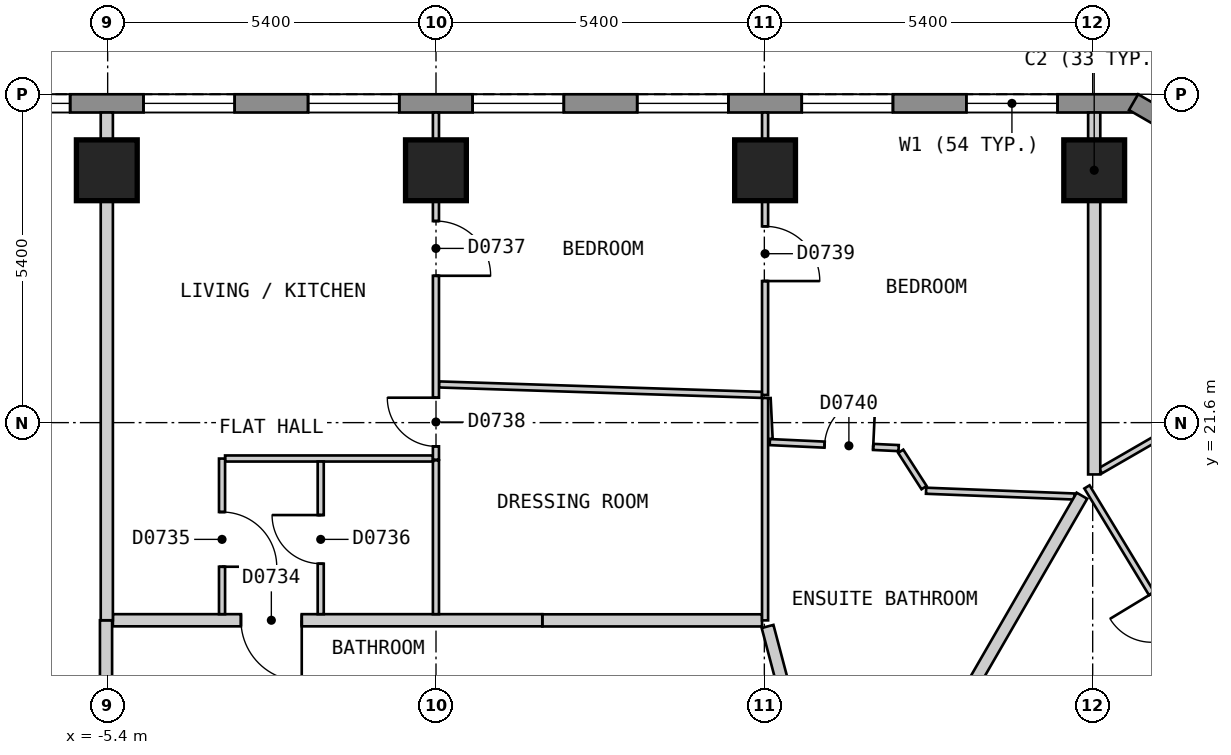
"""IFC4 building model, lengths in metres.
Left out: names, types, materials, properties, quantities, classifications, styles, units other than length and angle.
Written with IfcOpenShell. Run it as: python <this file> out.ifc"""

import sys

from ifc_helpers import new_model, si_unit, direction, frame, frame_2d, origin, origin_2d, place, context, subcontext, project, spatial, polyline, rectangle, outline, extrude, element, fill, save


model = new_model("IFC4")
c1 = context("Model", 3, precision=1e-05, world=origin(), true_north=direction((0.0, 1.0)))
c2 = subcontext(c1, "Body", "Model", "MODEL_VIEW")
j1 = project(units=[si_unit("LENGTHUNIT", "METRE"), si_unit("PLANEANGLEUNIT", "RADIAN")], contexts=[c1])
p1 = place(None, origin())
s1 = spatial("IfcSite", under=j1, at=p1, CompositionType="ELEMENT")
p2 = place(p1, origin())
s2 = spatial("IfcBuilding", under=s1, at=p2, CompositionType="ELEMENT")
p3 = place(p2, frame((0.0, 0.0, 93.0)))
s3 = spatial("IfcBuildingStorey", under=s2, at=p3, CompositionType="ELEMENT", Elevation=93.0)
for number, where, z_axis, x_axis in (
    (1, (10.825, 25.75, 0.0), (0.0, 0.0, 1.0), (-1.0, 0.0, 0.0)),
    (2, (5.412, 25.75, 0.0), (0.0, 0.0, 1.0), (-1.0, 0.0, 0.0)),
    (3, (-0.001, 25.75, 0.0), (0.0, 0.0, 1.0), (-1.0, 0.0, 0.0)),
    (4, (-5.414, 25.75, 0.0), (0.0, 0.0, 1.0), (-1.0, 0.0, 0.0)),
):
    element("IfcColumn", number, at=place(p3, frame(where, z_axis=z_axis, x_axis=x_axis)), inside=s3, PredefinedType="COLUMN", context=c2, shape_type="SweptSolid", body=[
        extrude(rectangle(XDim=1.0, YDim=1.0, at=origin_2d()), origin(), (0.0, 0.0, 1.0), 3.0),
    ])
p4 = place(p3, frame((11.547, 26.85, 0.0), z_axis=(0.0, 0.0, 1.0), x_axis=(-1.0, 0.0, 0.0)))
e5 = element("IfcWall", 5, at=p4, inside=s3, PredefinedType="SOLIDWALL", context=c2, shape_type="SweptSolid", body=[
    extrude(outline(polyline([(0.0, -0.15), (23.094, -0.15), (23.014, 0.15), (0.08, 0.15), (0.0, -0.15)])), origin(), (0.0, 0.0, 1.0), 2.7),
])
p5 = place(p4, frame((1.325, 0.0, 0.15)))
e6 = element("IfcOpeningElement", 6, at=p5, cuts=e5, PredefinedType="OPENING", context=c2, shape_type="SweptSolid", body=[
    extrude(rectangle(XDim=1.5, YDim=2.1, at=frame_2d((0.75, 1.05))), frame((0.0, 0.16, 0.0), z_axis=(0.0, -1.0, 0.0), x_axis=(1.0, 0.0, 0.0)), (0.0, 0.0, 1.0), 0.32),
])
p6 = place(p4, frame((4.032, 0.0, 0.15)))
e7 = element("IfcOpeningElement", 7, at=p6, cuts=e5, PredefinedType="OPENING", context=c2, shape_type="SweptSolid", body=[
    extrude(rectangle(XDim=1.5, YDim=2.1, at=frame_2d((0.75, 1.05))), frame((0.0, 0.16, 0.0), z_axis=(0.0, -1.0, 0.0), x_axis=(1.0, 0.0, 0.0)), (0.0, 0.0, 1.0), 0.32),
])
p7 = place(p4, frame((6.738, 0.0, 0.15)))
e8 = element("IfcOpeningElement", 8, at=p7, cuts=e5, PredefinedType="OPENING", context=c2, shape_type="SweptSolid", body=[
    extrude(rectangle(XDim=1.5, YDim=2.1, at=frame_2d((0.75, 1.05))), frame((0.0, 0.16, 0.0), z_axis=(0.0, -1.0, 0.0), x_axis=(1.0, 0.0, 0.0)), (0.0, 0.0, 1.0), 0.32),
])
p8 = place(p4, frame((9.445, 0.0, 0.15)))
e9 = element("IfcOpeningElement", 9, at=p8, cuts=e5, PredefinedType="OPENING", context=c2, shape_type="SweptSolid", body=[
    extrude(rectangle(XDim=1.5, YDim=2.1, at=frame_2d((0.75, 1.05))), frame((0.0, 0.16, 0.0), z_axis=(0.0, -1.0, 0.0), x_axis=(1.0, 0.0, 0.0)), (0.0, 0.0, 1.0), 0.32),
])
p9 = place(p4, frame((12.151, 0.0, 0.15)))
e10 = element("IfcOpeningElement", 10, at=p9, cuts=e5, PredefinedType="OPENING", context=c2, shape_type="SweptSolid", body=[
    extrude(rectangle(XDim=1.5, YDim=2.1, at=frame_2d((0.75, 1.05))), frame((0.0, 0.16, 0.0), z_axis=(0.0, -1.0, 0.0), x_axis=(1.0, 0.0, 0.0)), (0.0, 0.0, 1.0), 0.32),
])
p10 = place(p4, frame((14.858, 0.0, 0.15)))
e11 = element("IfcOpeningElement", 11, at=p10, cuts=e5, PredefinedType="OPENING", context=c2, shape_type="SweptSolid", body=[
    extrude(rectangle(XDim=1.5, YDim=2.1, at=frame_2d((0.75, 1.05))), frame((0.0, 0.16, 0.0), z_axis=(0.0, -1.0, 0.0), x_axis=(1.0, 0.0, 0.0)), (0.0, 0.0, 1.0), 0.32),
])
p11 = place(p4, frame((17.564, 0.0, 0.15)))
e12 = element("IfcOpeningElement", 12, at=p11, cuts=e5, PredefinedType="OPENING", context=c2, shape_type="SweptSolid", body=[
    extrude(rectangle(XDim=1.5, YDim=2.1, at=frame_2d((0.75, 1.05))), frame((0.0, 0.16, 0.0), z_axis=(0.0, -1.0, 0.0), x_axis=(1.0, 0.0, 0.0)), (0.0, 0.0, 1.0), 0.32),
])
p12 = place(p4, frame((20.271, 0.0, 0.15)))
e13 = element("IfcOpeningElement", 13, at=p12, cuts=e5, PredefinedType="OPENING", context=c2, shape_type="SweptSolid", body=[
    extrude(rectangle(XDim=1.5, YDim=2.1, at=frame_2d((0.75, 1.05))), frame((0.0, 0.16, 0.0), z_axis=(0.0, -1.0, 0.0), x_axis=(1.0, 0.0, 0.0)), (0.0, 0.0, 1.0), 0.32),
])
p13 = place(p3, frame((15.802, 24.37, 0.0), z_axis=(0.0, 0.0, 1.0), x_axis=(-0.866022959057, 0.500004234368, 0.0)))
e14 = element("IfcWall", 14, at=p13, inside=s3, PredefinedType="SOLIDWALL", context=c2, shape_type="SweptSolid", body=[
    extrude(outline(polyline([(0.0, -0.15), (5.0, -0.15), (4.92, 0.15), (0.08, 0.15), (0.0, -0.15)])), origin(), (0.0, 0.0, 1.0), 2.7),
])
p14 = place(p13, frame((0.65, 0.0, 0.15)))
e15 = element("IfcOpeningElement", 15, at=p14, cuts=e14, PredefinedType="OPENING", context=c2, shape_type="SweptSolid", body=[
    extrude(rectangle(XDim=1.2, YDim=2.1, at=frame_2d((0.6, 1.05))), frame((0.0, 0.16, 0.0), z_axis=(0.0, -1.0, 0.0), x_axis=(1.0, 0.0, 0.0)), (0.0, 0.0, 1.0), 0.32),
])
p15 = place(p13, frame((3.15, 0.0, 0.15)))
e16 = element("IfcOpeningElement", 16, at=p15, cuts=e14, PredefinedType="OPENING", context=c2, shape_type="SweptSolid", body=[
    extrude(rectangle(XDim=1.2, YDim=2.1, at=frame_2d((0.6, 1.05))), frame((0.0, 0.16, 0.0), z_axis=(0.0, -1.0, 0.0), x_axis=(1.0, 0.0, 0.0)), (0.0, 0.0, 1.0), 0.32),
])
p16 = place(p3, frame((5.453, 18.248, 0.0), z_axis=(0.0, 0.0, 1.0), x_axis=(0.255687088482, -0.9667595941, 0.0)))
e17 = element("IfcWall", 17, at=p16, inside=s3, PredefinedType="PARTITIONING", context=c2, shape_type="SweptSolid", body=[
    extrude(rectangle(XDim=1.6, YDim=0.2, at=frame_2d((0.8, 0.0))), origin(), (0.0, 0.0, 1.0), 2.7),
])
p17 = place(p3, frame((1.75, 18.348, 0.0), z_axis=(0.0, 0.0, 1.0), x_axis=(1.0, 0.0, 0.0)))
e18 = element("IfcWall", 18, at=p17, inside=s3, PredefinedType="PARTITIONING", context=c2, shape_type="SweptSolid", body=[
    extrude(rectangle(XDim=3.612, YDim=0.2, at=frame_2d((1.806, 0.0))), origin(), (0.0, 0.0, 1.0), 2.7),
])
p18 = place(p3, frame((-5.314, 18.35, 0.0), z_axis=(0.0, 0.0, 1.0), x_axis=(1.0, 0.0, 0.0)))
e19 = element("IfcWall", 19, at=p18, inside=s3, PredefinedType="PARTITIONING", context=c2, shape_type="SweptSolid", body=[
    extrude(rectangle(XDim=7.062, YDim=0.2, at=frame_2d((3.531, 0.0))), origin(), (0.0, 0.0, 1.0), 2.7),
])
p19 = place(p18, frame((2.106, 0.0, 0.0)))
e20 = element("IfcOpeningElement", 20, at=p19, cuts=e19, PredefinedType="OPENING", context=c2, shape_type="SweptSolid", body=[
    extrude(rectangle(XDim=1.0, YDim=2.1, at=frame_2d((0.5, 1.05))), frame((0.0, 0.11, 0.0), z_axis=(0.0, -1.0, 0.0), x_axis=(1.0, 0.0, 0.0)), (0.0, 0.0, 1.0), 0.22),
])
p20 = place(p3, frame((-5.427, 17.4, 0.0), z_axis=(0.0, 0.0, 1.0), x_axis=(0.0, 1.0, 0.0)))
e21 = element("IfcWall", 21, at=p20, inside=s3, PredefinedType="PARTITIONING", context=c2, shape_type="SweptSolid", body=[
    extrude(rectangle(XDim=0.95, YDim=0.2, at=frame_2d((0.475, 0.0))), origin(), (0.0, 0.0, 1.0), 2.7),
])
p21 = place(p3, frame((7.643, 21.129, 0.0), z_axis=(0.0, 0.0, 1.0), x_axis=(0.540427628168, -0.841390503104, 0.0)))
e22 = element("IfcWall", 22, at=p21, inside=s3, PredefinedType="PARTITIONING", context=c2, shape_type="SweptSolid", body=[
    extrude(rectangle(XDim=0.711, YDim=0.1, at=frame_2d((0.355, 0.0))), origin(), (0.0, 0.0, 1.0), 2.7),
])
p22 = place(p3, frame((10.706, 20.543, 0.0), z_axis=(0.0, 0.0, 1.0), x_axis=(0.518240414093, -0.855234981278, 0.0)))
e23 = element("IfcWall", 23, at=p22, inside=s3, PredefinedType="PARTITIONING", context=c2, shape_type="SweptSolid", body=[
    extrude(rectangle(XDim=4.855, YDim=0.1, at=frame_2d((2.427, 0.0))), origin(), (0.0, 0.0, 1.0), 2.7),
])
p23 = place(p22, frame((2.052, 0.0, 0.0)))
e24 = element("IfcOpeningElement", 24, at=p23, cuts=e23, PredefinedType="OPENING", context=c2, shape_type="SweptSolid", body=[
    extrude(rectangle(XDim=0.8, YDim=2.1, at=frame_2d((0.4, 1.05))), frame((0.0, 0.06, 0.0), z_axis=(0.0, -1.0, 0.0), x_axis=(1.0, 0.0, 0.0)), (0.0, 0.0, 1.0), 0.12),
])
p24 = place(p3, frame((5.454, 22.002, 0.0), z_axis=(0.0, 0.0, 1.0), x_axis=(0.048996315227, -0.998798959298, 0.0)))
e25 = element("IfcWall", 25, at=p24, inside=s3, PredefinedType="PARTITIONING", context=c2, shape_type="SweptSolid", body=[
    extrude(rectangle(XDim=0.673, YDim=0.1, at=frame_2d((0.336, 0.0))), origin(), (0.0, 0.0, 1.0), 2.7),
])
p25 = place(p3, frame((-0.001, 20.98, 0.0), z_axis=(0.0, 0.0, 1.0), x_axis=(0.0, -1.0, 0.0)))
e26 = element("IfcWall", 26, at=p25, inside=s3, PredefinedType="PARTITIONING", context=c2, shape_type="SweptSolid", body=[
    extrude(rectangle(XDim=2.53, YDim=0.1, at=frame_2d((1.265, 0.0))), origin(), (0.0, 0.0, 1.0), 2.7),
])
p26 = place(p3, frame((5.412, 22.005, 0.0), z_axis=(0.0, 0.0, 1.0), x_axis=(0.0, -1.0, 0.0)))
e27 = element("IfcWall", 27, at=p26, inside=s3, PredefinedType="PARTITIONING", context=c2, shape_type="SweptSolid", body=[
    extrude(rectangle(XDim=3.657, YDim=0.1, at=frame_2d((1.829, 0.0))), origin(), (0.0, 0.0, 1.0), 2.7),
])
p27 = place(p3, frame((8.06, 20.48, 0.0), z_axis=(0.0, 0.0, 1.0), x_axis=(0.999243345912, -0.038893902497, 0.0)))
e28 = element("IfcWall", 28, at=p27, inside=s3, PredefinedType="PARTITIONING", context=c2, shape_type="SweptSolid", body=[
    extrude(rectangle(XDim=2.442, YDim=0.1, at=frame_2d((1.221, 0.0))), origin(), (0.0, 0.0, 1.0), 2.7),
])
p28 = place(p3, frame((0.049, 22.228, 0.0), z_axis=(0.0, 0.0, 1.0), x_axis=(0.99947566488, -0.032378933174, 0.0)))
e29 = element("IfcWall", 29, at=p28, inside=s3, PredefinedType="PARTITIONING", context=c2, shape_type="SweptSolid", body=[
    extrude(rectangle(XDim=5.316, YDim=0.1, at=frame_2d((2.658, 0.0))), origin(), (0.0, 0.0, 1.0), 2.7),
])
p29 = place(p3, frame((5.49, 21.28, 0.0), z_axis=(0.0, 0.0, 1.0), x_axis=(0.998907627838, -0.046728482187, 0.0)))
e30 = element("IfcWall", 30, at=p29, inside=s3, PredefinedType="PARTITIONING", context=c2, shape_type="SweptSolid", body=[
    extrude(rectangle(XDim=2.121, YDim=0.1, at=frame_2d((1.061, 0.0))), origin(), (0.0, 0.0, 1.0), 2.7),
])
p30 = place(p29, frame((0.902, 0.0, 0.0)))
e31 = element("IfcOpeningElement", 31, at=p30, cuts=e30, PredefinedType="OPENING", context=c2, shape_type="SweptSolid", body=[
    extrude(rectangle(XDim=0.8, YDim=2.1, at=frame_2d((0.4, 1.05))), frame((0.0, 0.06, 0.0), z_axis=(0.0, -1.0, 0.0), x_axis=(1.0, 0.0, 0.0)), (0.0, 0.0, 1.0), 0.12),
])
p31 = place(p3, frame((-3.469, 21.01, 0.0), z_axis=(0.0, 0.0, 1.0), x_axis=(1.0, 0.0, 0.0)))
e32 = element("IfcWall", 32, at=p31, inside=s3, PredefinedType="PARTITIONING", context=c2, shape_type="SweptSolid", body=[
    extrude(rectangle(XDim=3.418, YDim=0.1, at=frame_2d((1.709, 0.0))), origin(), (0.0, 0.0, 1.0), 2.7),
])
p32 = place(p3, frame((5.412, 22.055, 0.0), z_axis=(0.0, 0.0, 1.0), x_axis=(0.0, 1.0, 0.0)))
e33 = element("IfcWall", 33, at=p32, inside=s3, PredefinedType="PARTITIONING", context=c2, shape_type="SweptSolid", body=[
    extrude(rectangle(XDim=4.645, YDim=0.1, at=frame_2d((2.323, 0.0))), origin(), (0.0, 0.0, 1.0), 2.7),
])
p33 = place(p32, frame((1.873, 0.0, 0.0)))
e34 = element("IfcOpeningElement", 34, at=p33, cuts=e33, PredefinedType="OPENING", context=c2, shape_type="SweptSolid", body=[
    extrude(rectangle(XDim=0.9, YDim=2.1, at=frame_2d((0.45, 1.05))), frame((0.0, 0.06, 0.0), z_axis=(0.0, -1.0, 0.0), x_axis=(1.0, 0.0, 0.0)), (0.0, 0.0, 1.0), 0.12),
])
p34 = place(p3, frame((-0.001, 20.99, 0.0), z_axis=(0.0, 0.0, 1.0), x_axis=(0.0, 1.0, 0.0)))
e35 = element("IfcWall", 35, at=p34, inside=s3, PredefinedType="PARTITIONING", context=c2, shape_type="SweptSolid", body=[
    extrude(rectangle(XDim=5.71, YDim=0.1, at=frame_2d((2.855, 0.0))), origin(), (0.0, 0.0, 1.0), 2.7),
])
p35 = place(p34, frame((3.025, 0.0, 0.0)))
e36 = element("IfcOpeningElement", 36, at=p35, cuts=e35, PredefinedType="OPENING", context=c2, shape_type="SweptSolid", body=[
    extrude(rectangle(XDim=0.9, YDim=2.1, at=frame_2d((0.45, 1.05))), frame((0.0, 0.06, 0.0), z_axis=(0.0, -1.0, 0.0), x_axis=(1.0, 0.0, 0.0)), (0.0, 0.0, 1.0), 0.12),
])
p36 = place(p34, frame((0.22, 0.0, 0.0)))
e37 = element("IfcOpeningElement", 37, at=p36, cuts=e35, PredefinedType="OPENING", context=c2, shape_type="SweptSolid", body=[
    extrude(rectangle(XDim=0.8, YDim=2.1, at=frame_2d((0.4, 1.05))), frame((0.0, 0.06, 0.0), z_axis=(0.0, -1.0, 0.0), x_axis=(1.0, 0.0, 0.0)), (0.0, 0.0, 1.0), 0.12),
])
p37 = place(p3, frame((-3.519, 18.45, 0.0), z_axis=(0.0, 0.0, 1.0), x_axis=(0.0, 1.0, 0.0)))
e38 = element("IfcWall", 38, at=p37, inside=s3, PredefinedType="PARTITIONING", context=c2, shape_type="SweptSolid", body=[
    extrude(rectangle(XDim=2.559, YDim=0.1, at=frame_2d((1.28, 0.0))), origin(), (0.0, 0.0, 1.0), 2.7),
])
p38 = place(p37, frame((0.78, 0.0, 0.0)))
e39 = element("IfcOpeningElement", 39, at=p38, cuts=e38, PredefinedType="OPENING", context=c2, shape_type="SweptSolid", body=[
    extrude(rectangle(XDim=0.9, YDim=2.1, at=frame_2d((0.45, 1.05))), frame((0.0, 0.06, 0.0), z_axis=(0.0, -1.0, 0.0), x_axis=(1.0, 0.0, 0.0)), (0.0, 0.0, 1.0), 0.12),
])
p39 = place(p3, frame((-1.896, 18.45, 0.0), z_axis=(0.0, 0.0, 1.0), x_axis=(0.0, 1.0, 0.0)))
e40 = element("IfcWall", 40, at=p39, inside=s3, PredefinedType="PARTITIONING", context=c2, shape_type="SweptSolid", body=[
    extrude(rectangle(XDim=2.51, YDim=0.1, at=frame_2d((1.255, 0.0))), origin(), (0.0, 0.0, 1.0), 2.7),
])
p40 = place(p39, frame((0.83, 0.0, 0.0)))
e41 = element("IfcOpeningElement", 41, at=p40, cuts=e40, PredefinedType="OPENING", context=c2, shape_type="SweptSolid", body=[
    extrude(rectangle(XDim=0.8, YDim=2.1, at=frame_2d((0.4, 1.05))), frame((0.0, 0.06, 0.0), z_axis=(0.0, -1.0, 0.0), x_axis=(1.0, 0.0, 0.0)), (0.0, 0.0, 1.0), 0.12),
])
p41 = place(p3, frame((9.83, 14.375, 0.0), z_axis=(0.0, 0.0, 1.0), x_axis=(0.866016855193, 0.500014806302, 0.0)))
e42 = element("IfcWall", 42, at=p41, inside=s3, PredefinedType="PARTITIONING", context=c2, shape_type="SweptSolid", body=[
    extrude(rectangle(XDim=10.0, YDim=0.1, at=frame_2d((5.0, 0.0))), origin(), (0.0, 0.0, 1.0), 2.7),
])
p42 = place(p41, frame((6.523, 0.0, 0.0)))
e43 = element("IfcOpeningElement", 43, at=p42, cuts=e42, PredefinedType="OPENING", context=c2, shape_type="SweptSolid", body=[
    extrude(rectangle(XDim=0.9, YDim=2.1, at=frame_2d((0.45, 1.05))), frame((0.0, 0.06, 0.0), z_axis=(0.0, -1.0, 0.0), x_axis=(1.0, 0.0, 0.0)), (0.0, 0.0, 1.0), 0.12),
])
p43 = place(p3, frame((10.926, 20.808, 0.0), z_axis=(0.0, 0.0, 1.0), x_axis=(0.86600925905, 0.500027962457, 0.0)))
e44 = element("IfcWall", 44, at=p43, inside=s3, PredefinedType="PARTITIONING", context=c2, shape_type="SweptSolid", body=[
    extrude(rectangle(XDim=5.834, YDim=0.1, at=frame_2d((2.917, 0.0))), origin(), (0.0, 0.0, 1.0), 2.7),
])
p44 = place(p43, frame((2.409, 0.0, 0.0)))
e45 = element("IfcOpeningElement", 45, at=p44, cuts=e44, PredefinedType="OPENING", context=c2, shape_type="SweptSolid", body=[
    extrude(rectangle(XDim=0.9, YDim=2.1, at=frame_2d((0.45, 1.05))), frame((0.0, 0.06, 0.0), z_axis=(0.0, -1.0, 0.0), x_axis=(1.0, 0.0, 0.0)), (0.0, 0.0, 1.0), 0.12),
])
p45 = place(p3, frame((-5.414, 26.7, 0.0), z_axis=(0.0, 0.0, 1.0), x_axis=(0.0, -1.0, 0.0)))
e46 = element("IfcWall", 46, at=p45, inside=s3, PredefinedType="PARTITIONING", context=c2, shape_type="SweptSolid", body=[
    extrude(rectangle(XDim=8.35, YDim=0.2, at=frame_2d((4.175, 0.0))), origin(), (0.0, 0.0, 1.0), 2.7),
])
p46 = place(p3, frame((8.43, 16.6, 0.0), z_axis=(0.0, 0.0, 1.0), x_axis=(0.500072613115, 0.865983476524, 0.0)))
e47 = element("IfcWall", 47, at=p46, inside=s3, PredefinedType="PARTITIONING", context=c2, shape_type="SweptSolid", body=[
    extrude(rectangle(XDim=4.385, YDim=0.2, at=frame_2d((2.193, 0.0))), origin(), (0.0, 0.0, 1.0), 2.7),
])
p47 = place(p3, frame((10.825, 20.748, 0.0), z_axis=(0.0, 0.0, 1.0), x_axis=(0.0, 1.0, 0.0)))
e48 = element("IfcWall", 48, at=p47, inside=s3, PredefinedType="PARTITIONING", context=c2, shape_type="SweptSolid", body=[
    extrude(rectangle(XDim=5.952, YDim=0.2, at=frame_2d((2.976, 0.0))), origin(), (0.0, 0.0, 1.0), 2.7),
])
p48 = place(p5, origin())
e49 = element("IfcWindow", 49, at=p48, inside=s3, PartitioningType="SINGLE_PANEL", PredefinedType="WINDOW", context=c2, shape_type="SweptSolid", body=[
    extrude(rectangle(XDim=1.5, YDim=2.1, at=frame_2d((0.75, 1.05))), frame((0.0, 0.03, 0.0), z_axis=(0.0, -1.0, 0.0), x_axis=(1.0, 0.0, 0.0)), (0.0, 0.0, 1.0), 0.06),
])
fill(e6, e49)
p49 = place(p6, origin())
e50 = element("IfcWindow", 50, at=p49, inside=s3, PartitioningType="SINGLE_PANEL", PredefinedType="WINDOW", context=c2, shape_type="SweptSolid", body=[
    extrude(rectangle(XDim=1.5, YDim=2.1, at=frame_2d((0.75, 1.05))), frame((0.0, 0.03, 0.0), z_axis=(0.0, -1.0, 0.0), x_axis=(1.0, 0.0, 0.0)), (0.0, 0.0, 1.0), 0.06),
])
fill(e7, e50)
p50 = place(p7, origin())
e51 = element("IfcWindow", 51, at=p50, inside=s3, PartitioningType="SINGLE_PANEL", PredefinedType="WINDOW", context=c2, shape_type="SweptSolid", body=[
    extrude(rectangle(XDim=1.5, YDim=2.1, at=frame_2d((0.75, 1.05))), frame((0.0, 0.03, 0.0), z_axis=(0.0, -1.0, 0.0), x_axis=(1.0, 0.0, 0.0)), (0.0, 0.0, 1.0), 0.06),
])
fill(e8, e51)
p51 = place(p8, origin())
e52 = element("IfcWindow", 52, at=p51, inside=s3, PartitioningType="SINGLE_PANEL", PredefinedType="WINDOW", context=c2, shape_type="SweptSolid", body=[
    extrude(rectangle(XDim=1.5, YDim=2.1, at=frame_2d((0.75, 1.05))), frame((0.0, 0.03, 0.0), z_axis=(0.0, -1.0, 0.0), x_axis=(1.0, 0.0, 0.0)), (0.0, 0.0, 1.0), 0.06),
])
fill(e9, e52)
p52 = place(p9, origin())
e53 = element("IfcWindow", 53, at=p52, inside=s3, PartitioningType="SINGLE_PANEL", PredefinedType="WINDOW", context=c2, shape_type="SweptSolid", body=[
    extrude(rectangle(XDim=1.5, YDim=2.1, at=frame_2d((0.75, 1.05))), frame((0.0, 0.03, 0.0), z_axis=(0.0, -1.0, 0.0), x_axis=(1.0, 0.0, 0.0)), (0.0, 0.0, 1.0), 0.06),
])
fill(e10, e53)
p53 = place(p10, origin())
e54 = element("IfcWindow", 54, at=p53, inside=s3, PartitioningType="SINGLE_PANEL", PredefinedType="WINDOW", context=c2, shape_type="SweptSolid", body=[
    extrude(rectangle(XDim=1.5, YDim=2.1, at=frame_2d((0.75, 1.05))), frame((0.0, 0.03, 0.0), z_axis=(0.0, -1.0, 0.0), x_axis=(1.0, 0.0, 0.0)), (0.0, 0.0, 1.0), 0.06),
])
fill(e11, e54)
p54 = place(p11, origin())
e55 = element("IfcWindow", 55, at=p54, inside=s3, PartitioningType="SINGLE_PANEL", PredefinedType="WINDOW", context=c2, shape_type="SweptSolid", body=[
    extrude(rectangle(XDim=1.5, YDim=2.1, at=frame_2d((0.75, 1.05))), frame((0.0, 0.03, 0.0), z_axis=(0.0, -1.0, 0.0), x_axis=(1.0, 0.0, 0.0)), (0.0, 0.0, 1.0), 0.06),
])
fill(e12, e55)
p55 = place(p23, origin())
e56 = element("IfcDoor", 56, at=p55, inside=s3, OperationType="SINGLE_SWING_LEFT", PredefinedType="DOOR", context=c2, shape_type="SweptSolid", body=[
    extrude(rectangle(XDim=0.8, YDim=2.1, at=frame_2d((0.4, 1.05))), frame((0.0, 0.025, 0.0), z_axis=(0.0, -1.0, 0.0), x_axis=(1.0, 0.0, 0.0)), (0.0, 0.0, 1.0), 0.05),
])
fill(e24, e56)
p56 = place(p19, origin())
e57 = element("IfcDoor", 57, at=p56, inside=s3, OperationType="SINGLE_SWING_RIGHT", PredefinedType="DOOR", context=c2, shape_type="SweptSolid", body=[
    extrude(rectangle(XDim=1.0, YDim=2.1, at=frame_2d((0.5, 1.05))), frame((0.0, 0.025, 0.0), z_axis=(0.0, -1.0, 0.0), x_axis=(1.0, 0.0, 0.0)), (0.0, 0.0, 1.0), 0.05),
])
fill(e20, e57)
p57 = place(p38, origin())
e58 = element("IfcDoor", 58, at=p57, inside=s3, OperationType="SINGLE_SWING_LEFT", PredefinedType="DOOR", context=c2, shape_type="SweptSolid", body=[
    extrude(rectangle(XDim=0.9, YDim=2.1, at=frame_2d((0.45, 1.05))), frame((0.0, 0.025, 0.0), z_axis=(0.0, -1.0, 0.0), x_axis=(1.0, 0.0, 0.0)), (0.0, 0.0, 1.0), 0.05),
])
fill(e39, e58)
p58 = place(p40, origin())
e59 = element("IfcDoor", 59, at=p58, inside=s3, OperationType="SINGLE_SWING_RIGHT", PredefinedType="DOOR", context=c2, shape_type="SweptSolid", body=[
    extrude(rectangle(XDim=0.8, YDim=2.1, at=frame_2d((0.4, 1.05))), frame((0.0, 0.025, 0.0), z_axis=(0.0, -1.0, 0.0), x_axis=(1.0, 0.0, 0.0)), (0.0, 0.0, 1.0), 0.05),
])
fill(e41, e59)
p59 = place(p35, origin())
e60 = element("IfcDoor", 60, at=p59, inside=s3, OperationType="SINGLE_SWING_LEFT", PredefinedType="DOOR", context=c2, shape_type="SweptSolid", body=[
    extrude(rectangle(XDim=0.9, YDim=2.1, at=frame_2d((0.45, 1.05))), frame((0.0, 0.025, 0.0), z_axis=(0.0, -1.0, 0.0), x_axis=(1.0, 0.0, 0.0)), (0.0, 0.0, 1.0), 0.05),
])
fill(e36, e60)
p60 = place(p36, origin())
e61 = element("IfcDoor", 61, at=p60, inside=s3, OperationType="SINGLE_SWING_RIGHT", PredefinedType="DOOR", context=c2, shape_type="SweptSolid", body=[
    extrude(rectangle(XDim=0.8, YDim=2.1, at=frame_2d((0.4, 1.05))), frame((0.0, 0.025, 0.0), z_axis=(0.0, -1.0, 0.0), x_axis=(1.0, 0.0, 0.0)), (0.0, 0.0, 1.0), 0.05),
])
fill(e37, e61)
p61 = place(p33, origin())
e62 = element("IfcDoor", 62, at=p61, inside=s3, OperationType="SINGLE_SWING_LEFT", PredefinedType="DOOR", context=c2, shape_type="SweptSolid", body=[
    extrude(rectangle(XDim=0.9, YDim=2.1, at=frame_2d((0.45, 1.05))), frame((0.0, 0.025, 0.0), z_axis=(0.0, -1.0, 0.0), x_axis=(1.0, 0.0, 0.0)), (0.0, 0.0, 1.0), 0.05),
])
fill(e34, e62)
p62 = place(p30, origin())
e63 = element("IfcDoor", 63, at=p62, inside=s3, OperationType="SINGLE_SWING_RIGHT", PredefinedType="DOOR", context=c2, shape_type="SweptSolid", body=[
    extrude(rectangle(XDim=0.8, YDim=2.1, at=frame_2d((0.4, 1.05))), frame((0.0, 0.025, 0.0), z_axis=(0.0, -1.0, 0.0), x_axis=(1.0, 0.0, 0.0)), (0.0, 0.0, 1.0), 0.05),
])
fill(e31, e63)
save(model, sys.argv[1])
